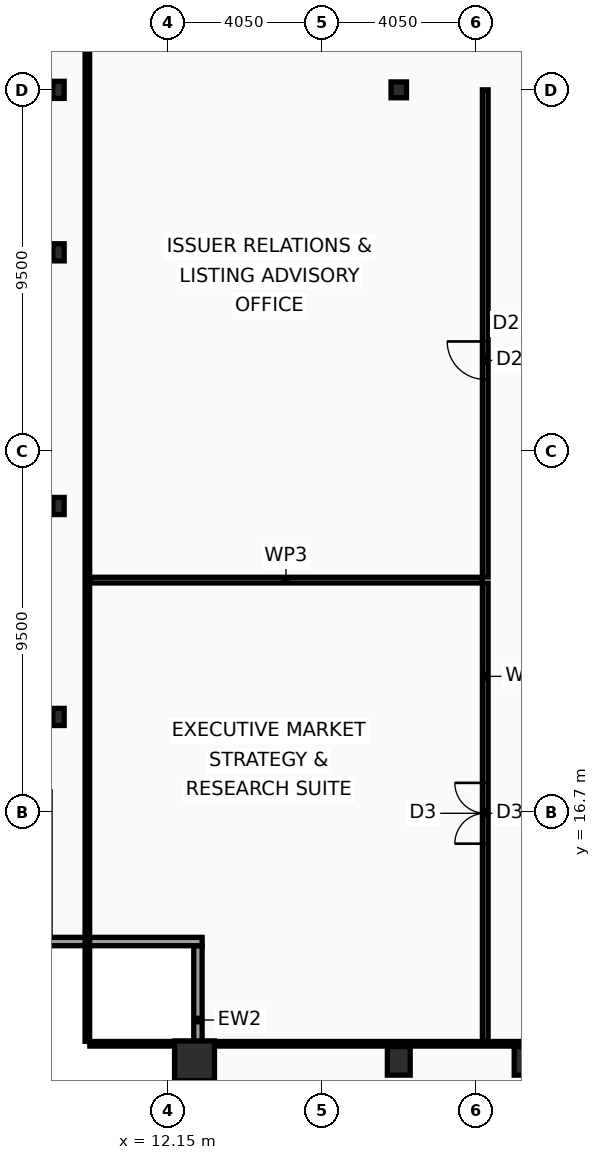
"""IFC4 building model, lengths in metres.
Left out: names, types, materials, properties, quantities, classifications, styles, units other than length and angle.
Written with IfcOpenShell. Run it as: python <this file> out.ifc"""

import sys

from ifc_helpers import new_model, si_unit, direction, frame, frame_2d, origin, origin_2d, place, context, subcontext, project, spatial, rectangle, hollow_rectangle, i_section, extrude, element, fill, save


model = new_model("IFC4")
c1 = context("Model", 3, precision=1e-05, world=origin(), true_north=direction((0.0, 1.0)))
c2 = subcontext(c1, "Body", "Model", "MODEL_VIEW")
j1 = project(units=[si_unit("LENGTHUNIT", "METRE"), si_unit("PLANEANGLEUNIT", "RADIAN")], contexts=[c1])
p1 = place(None, origin())
s1 = spatial("IfcSite", under=j1, at=p1, CompositionType="ELEMENT")
p2 = place(p1, origin())
s2 = spatial("IfcBuilding", under=s1, at=p2, CompositionType="ELEMENT")
p3 = place(p2, frame((0.0, 0.0, 265.4)))
s3 = spatial("IfcBuildingStorey", under=s2, at=p3, CompositionType="ELEMENT", Elevation=265.4)
p4 = place(p3, frame((12.85, 10.15, 0.0), z_axis=(0.0, 0.0, 1.0), x_axis=(1.0, 0.0, 0.0)))
e1 = element("IfcColumn", 1, at=p4, inside=s3, PredefinedType="COLUMN", context=c2, shape_type="SweptSolid", body=[
    extrude(hollow_rectangle(XDim=1.05, YDim=1.05, WallThickness=0.055, at=origin_2d()), origin(), (0.0, 0.0, 1.0), 4.4),
])
for number, where, z_axis, x_axis in (
    (2, (18.225, 10.15, 0.0), (0.0, 0.0, 1.0), (1.0, 0.0, 0.0)),
    (3, (21.562, 10.15, 0.0), (0.0, 0.0, 1.0), (1.0, 0.0, 0.0)),
):
    element("IfcColumn", number, at=place(p3, frame(where, z_axis=z_axis, x_axis=x_axis)), inside=s3, PredefinedType="COLUMN", context=c2, shape_type="SweptSolid", body=[
        extrude(hollow_rectangle(XDim=0.6, YDim=0.75, WallThickness=0.045, at=origin_2d()), origin(), (0.0, 0.0, 1.0), 4.4),
    ])
for number, where, z_axis, x_axis in (
    (4, (9.27, 19.2, 0.0), (0.0, 0.0, 1.0), (1.0, 0.0, 0.0)),
    (5, (9.27, 24.75, 0.0), (0.0, 0.0, 1.0), (1.0, 0.0, 0.0)),
    (6, (9.27, 31.425, 0.0), (0.0, 0.0, 1.0), (1.0, 0.0, 0.0)),
    (7, (9.27, 35.7, 0.0), (0.0, 0.0, 1.0), (1.0, 0.0, 0.0)),
):
    element("IfcColumn", number, at=place(p3, frame(where, z_axis=z_axis, x_axis=x_axis)), inside=s3, PredefinedType="COLUMN", context=c2, shape_type="SweptSolid", body=[
        extrude(i_section(OverallWidth=0.3, OverallDepth=0.45, WebThickness=0.014, FlangeThickness=0.026, at=origin_2d()), origin(), (0.0, 0.0, 1.0), 4.4),
    ])
p5 = place(p3, frame((18.225, 35.7, 0.0), z_axis=(0.0, 0.0, 1.0), x_axis=(1.0, 0.0, 0.0)))
e8 = element("IfcColumn", 8, at=p5, inside=s3, PredefinedType="COLUMN", context=c2, shape_type="SweptSolid", body=[
    extrude(i_section(OverallWidth=0.406, OverallDepth=0.416, WebThickness=0.03, FlangeThickness=0.048, at=origin_2d()), origin(), (0.0, 0.0, 1.0), 4.4),
])
p6 = place(p3, frame((12.94, 9.27, 0.0), z_axis=(0.0, 0.0, 1.0), x_axis=(0.0, 1.0, 0.0)))
e9 = element("IfcWall", 9, at=p6, inside=s3, PredefinedType="SOLIDWALL", context=c2, shape_type="SweptSolid", body=[
    extrude(rectangle(XDim=3.91, YDim=0.22, at=frame_2d((1.955, 0.0))), origin(), (0.0, 0.0, 1.0), 3.68),
])
p7 = place(p3, frame((13.05, 13.29, 0.0), z_axis=(0.0, 0.0, 1.0), x_axis=(-1.0, 0.0, 0.0)))
e10 = element("IfcWall", 10, at=p7, inside=s3, PredefinedType="SOLIDWALL", context=c2, shape_type="SweptSolid", body=[
    extrude(rectangle(XDim=4.22, YDim=0.22, at=frame_2d((2.11, 0.0))), origin(), (0.0, 0.0, 1.0), 3.68),
])
p8 = place(p3, frame((20.5, 10.665, 0.0), z_axis=(0.0, 0.0, 1.0), x_axis=(0.0, 1.0, 0.0)))
e11 = element("IfcWall", 11, at=p8, inside=s3, PredefinedType="PARTITIONING", context=c2, shape_type="SweptSolid", body=[
    extrude(rectangle(XDim=12.055, YDim=0.15, at=frame_2d((6.027, 0.0))), origin(), (0.0, 0.0, 1.0), 3.83),
])
p9 = place(p8, frame((5.2, 0.0, 0.0)))
e12 = element("IfcOpeningElement", 12, at=p9, cuts=e11, PredefinedType="OPENING", context=c2, shape_type="SweptSolid", body=[
    extrude(rectangle(XDim=1.6, YDim=2.15, at=frame_2d((0.8, 1.075))), frame((0.0, 0.085, 0.0), z_axis=(0.0, -1.0, 0.0), x_axis=(1.0, 0.0, 0.0)), (0.0, 0.0, 1.0), 0.17),
])
p10 = place(p3, frame((20.5, 22.88, 0.0), z_axis=(0.0, 0.0, 1.0), x_axis=(0.0, 1.0, 0.0)))
e13 = element("IfcWall", 13, at=p10, inside=s3, PredefinedType="PARTITIONING", context=c2, shape_type="SweptSolid", body=[
    extrude(rectangle(XDim=12.82, YDim=0.15, at=frame_2d((6.41, 0.0))), origin(), (0.0, 0.0, 1.0), 3.83),
])
p11 = place(p10, frame((5.2, 0.0, 0.0)))
e14 = element("IfcOpeningElement", 14, at=p11, cuts=e13, PredefinedType="OPENING", context=c2, shape_type="SweptSolid", body=[
    extrude(rectangle(XDim=1.0, YDim=2.05, at=frame_2d((0.5, 1.025))), frame((0.0, 0.085, 0.0), z_axis=(0.0, -1.0, 0.0), x_axis=(1.0, 0.0, 0.0)), (0.0, 0.0, 1.0), 0.17),
])
p12 = place(p3, frame((10.095, 22.8, 0.0), z_axis=(0.0, 0.0, 1.0), x_axis=(1.0, 0.0, 0.0)))
e15 = element("IfcWall", 15, at=p12, inside=s3, PredefinedType="PARTITIONING", context=c2, shape_type="SweptSolid", body=[
    extrude(rectangle(XDim=10.325, YDim=0.15, at=frame_2d((5.163, 0.0))), origin(), (0.0, 0.0, 1.0), 3.58),
])
p13 = place(p3, frame((10.03, 10.665, 0.0), z_axis=(0.0, 0.0, 1.0), x_axis=(0.0, 1.0, 0.0)))
e16 = element("IfcWall", 16, at=p13, inside=s3, PredefinedType="PARTITIONING", context=c2, shape_type="SweptSolid", body=[
    extrude(rectangle(XDim=42.11, YDim=0.12, at=frame_2d((21.055, 0.0))), origin(), (0.0, 0.0, 1.0), 3.58),
])
p14 = place(p3, frame((10.095, 10.6, 0.0), z_axis=(0.0, 0.0, 1.0), x_axis=(1.0, 0.0, 0.0)))
e17 = element("IfcWall", 17, at=p14, inside=s3, PredefinedType="PARTITIONING", context=c2, shape_type="SweptSolid", body=[
    extrude(rectangle(XDim=52.71, YDim=0.12, at=frame_2d((26.355, 0.0))), origin(), (0.0, 0.0, 1.0), 3.58),
])
p15 = place(p9, origin())
e18 = element("IfcDoor", 18, at=p15, inside=s3, OperationType="DOUBLE_DOOR_SINGLE_SWING", PredefinedType="DOOR", context=c2, shape_type="SweptSolid", body=[
    extrude(rectangle(XDim=1.6, YDim=2.15, at=frame_2d((0.8, 1.075))), frame((0.0, 0.025, 0.0), z_axis=(0.0, -1.0, 0.0), x_axis=(1.0, 0.0, 0.0)), (0.0, 0.0, 1.0), 0.05),
])
fill(e12, e18)
p16 = place(p11, origin())
e19 = element("IfcDoor", 19, at=p16, inside=s3, OperationType="SINGLE_SWING_RIGHT", PredefinedType="DOOR", context=c2, shape_type="SweptSolid", body=[
    extrude(rectangle(XDim=1.0, YDim=2.05, at=frame_2d((0.5, 1.025))), frame((0.0, 0.025, 0.0), z_axis=(0.0, -1.0, 0.0), x_axis=(1.0, 0.0, 0.0)), (0.0, 0.0, 1.0), 0.05),
])
fill(e14, e19)
save(model, sys.argv[1])
